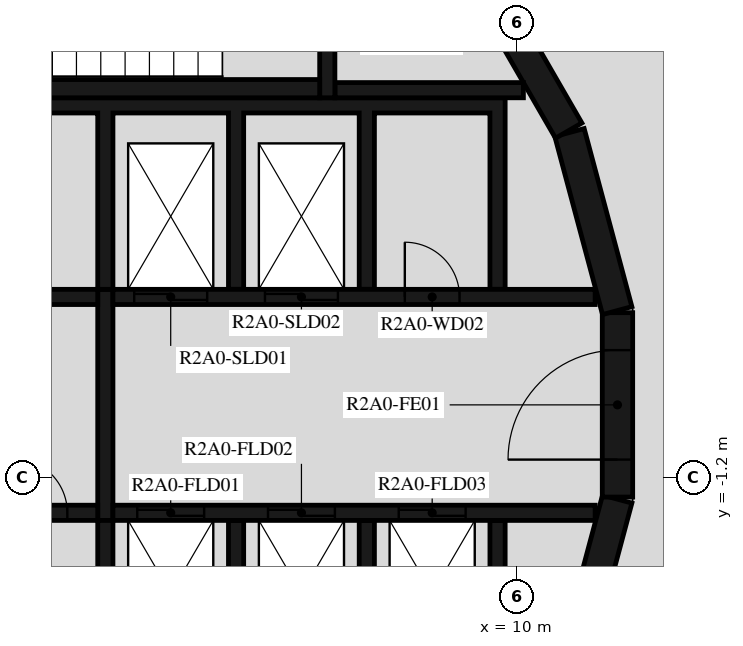
"""IFC4 building model, lengths in metres.
Left out: names, types, materials, properties, quantities, classifications, styles, units other than length and angle.
Written with IfcOpenShell. Run it as: python <this file> out.ifc"""

import sys

from ifc_helpers import new_model, si_unit, direction, frame, frame_2d, origin, place, context, subcontext, project, spatial, polyline, rectangle, outline, extrude, element, fill, save


model = new_model("IFC4")
c1 = context("Model", 3, precision=1e-05, world=origin(), true_north=direction((0.0, 1.0)))
c2 = subcontext(c1, "Body", "Model", "MODEL_VIEW")
j1 = project(units=[si_unit("LENGTHUNIT", "METRE"), si_unit("PLANEANGLEUNIT", "RADIAN")], contexts=[c1])
p1 = place(None, origin())
s1 = spatial("IfcSite", under=j1, at=p1, CompositionType="ELEMENT")
p2 = place(p1, origin())
s2 = spatial("IfcBuilding", under=s1, at=p2, CompositionType="ELEMENT")
p3 = place(p2, frame((0.0, 0.0, 76.7)))
s3 = spatial("IfcBuildingStorey", under=s2, at=p3, CompositionType="ELEMENT", Elevation=76.7)
p4 = place(p3, frame((10.858, -4.479, 0.0), z_axis=(0.0, 0.0, 1.0), x_axis=(0.258734743916, 0.965948410781, 0.0)))
e1 = element("IfcWall", 1, at=p4, inside=s3, PredefinedType="SHEAR", context=c2, shape_type="SweptSolid", body=[
    extrude(rectangle(XDim=3.033, YDim=0.5, at=frame_2d((1.516, 0.0))), origin(), (0.0, 0.0, 1.0), 3.12),
])
p5 = place(p3, frame((11.647, -1.516, 0.0), z_axis=(0.0, 0.0, 1.0), x_axis=(0.0, 1.0, 0.0)))
e2 = element("IfcWall", 2, at=p5, inside=s3, PredefinedType="SHEAR", context=c2, shape_type="SweptSolid", body=[
    extrude(rectangle(XDim=3.033, YDim=0.5, at=frame_2d((1.516, 0.0))), origin(), (0.0, 0.0, 1.0), 3.12),
])
p6 = place(p5, frame((0.616, 0.0, 0.0)))
e3 = element("IfcOpeningElement", 3, at=p6, cuts=e2, PredefinedType="OPENING", context=c2, shape_type="SweptSolid", body=[
    extrude(rectangle(XDim=1.8, YDim=2.1, at=frame_2d((0.9, 1.05))), frame((0.0, 0.26, 0.0), z_axis=(0.0, -1.0, 0.0), x_axis=(1.0, 0.0, 0.0)), (0.0, 0.0, 1.0), 0.52),
])
for number, where, z_axis, x_axis in (
    (4, (11.643, 1.55, 0.0), (0.0, 0.0, 1.0), (-0.259, 0.966, 0.0)),
    (5, (10.845, 4.51, 0.0), (0.0, 0.0, 1.0), (-0.5, 0.866, 0.0)),
):
    element("IfcWall", number, at=place(p3, frame(where, z_axis=z_axis, x_axis=x_axis)), inside=s3, PredefinedType="SHEAR", context=c2, shape_type="SweptSolid", body=[
        extrude(rectangle(XDim=3.033, YDim=0.5, at=frame_2d((1.516, 0.0))), origin(), (0.0, 0.0, 1.0), 3.12),
    ])
p7 = place(p3, frame((0.0, 5.2, 0.0), z_axis=(0.0, 0.0, 1.0), x_axis=(1.0, 0.0, 0.0)))
e6 = element("IfcWall", 6, at=p7, inside=s3, PredefinedType="SHEAR", context=c2, shape_type="SweptSolid", body=[
    extrude(rectangle(XDim=6.75, YDim=0.3, at=frame_2d((3.375, 0.0))), origin(), (0.0, 0.0, 1.0), 3.12),
])
p8 = place(p3, frame((6.875, 5.05, 0.0), z_axis=(0.0, 0.0, 1.0), x_axis=(0.0, 1.0, 0.0)))
e7 = element("IfcWall", 7, at=p8, inside=s3, PredefinedType="SHEAR", context=c2, shape_type="SweptSolid", body=[
    extrude(rectangle(XDim=3.92, YDim=0.25, at=frame_2d((1.96, 0.0))), origin(), (0.0, 0.0, 1.0), 3.12),
])
p9 = place(p8, frame((1.11, 0.0, 0.0)))
e8 = element("IfcOpeningElement", 8, at=p9, cuts=e7, PredefinedType="OPENING", context=c2, shape_type="SweptSolid", body=[
    extrude(rectangle(XDim=1.2, YDim=2.1, at=frame_2d((0.6, 1.05))), frame((0.0, 0.135, 0.0), z_axis=(0.0, -1.0, 0.0), x_axis=(1.0, 0.0, 0.0)), (0.0, 0.0, 1.0), 0.27),
])
p10 = place(p3, frame((7.0, 5.175, 0.0), z_axis=(0.0, 0.0, 1.0), x_axis=(1.0, 0.0, 0.0)))
e9 = element("IfcWall", 9, at=p10, inside=s3, PredefinedType="SHEAR", context=c2, shape_type="SweptSolid", body=[
    extrude(rectangle(XDim=3.1, YDim=0.25, at=frame_2d((1.55, 0.0))), origin(), (0.0, 0.0, 1.0), 3.12),
])
p11 = place(p3, origin())
e10 = element("IfcWall", 10, at=p11, inside=s3, PredefinedType="SHEAR", context=c2, shape_type="SweptSolid", body=[
    extrude(outline(polyline([(-9.55, 4.8), (-7.65, 4.8), (-7.65, 1.9), (-7.4, 1.9), (-7.4, 4.8), (-5.5, 4.8), (-5.5, 1.9), (-5.25, 1.9), (-5.25, 4.8), (-3.35, 4.8), (-3.35, 1.9), (-3.1, 1.9), (-3.1, 4.8), (-1.2, 4.8), (-1.2, 1.9), (-0.95, 1.9), (-0.95, 4.8), (3.1, 4.8), (3.1, 1.9), (3.35, 1.9), (3.35, 4.8), (5.25, 4.8), (5.25, 1.9), (5.5, 1.9), (5.5, 4.8), (7.4, 4.8), (7.4, 1.9), (7.65, 1.9), (7.65, 4.8), (9.55, 4.8), (9.55, 1.9), (9.8, 1.9), (9.8, 4.8), (9.8, 5.05), (-9.8, 5.05), (-9.8, 4.8), (-9.8, 1.9), (-9.55, 1.9), (-9.55, 4.8)])), origin(), (0.0, 0.0, 1.0), 3.12),
])
p12 = place(p3, origin())
e11 = element("IfcWall", 11, at=p12, inside=s3, PredefinedType="SHEAR", context=c2, shape_type="SweptSolid", body=[
    extrude(outline(polyline([(9.8, -5.05), (9.8, -4.8), (9.8, -1.9), (9.55, -1.9), (9.55, -4.8), (7.65, -4.8), (7.65, -1.9), (7.4, -1.9), (7.4, -4.8), (5.5, -4.8), (5.5, -1.9), (5.25, -1.9), (5.25, -4.8), (3.35, -4.8), (3.35, -1.9), (3.1, -1.9), (3.1, -4.8), (1.2, -4.8), (1.2, -1.9), (0.95, -1.9), (0.95, -4.8), (-0.95, -4.8), (-0.95, -1.9), (-1.2, -1.9), (-1.2, -4.8), (-5.25, -4.8), (-5.25, -1.9), (-5.5, -1.9), (-5.5, -4.8), (-7.4, -4.8), (-7.4, -1.9), (-7.65, -1.9), (-7.65, -4.8), (-9.55, -4.8), (-9.55, -1.9), (-9.8, -1.9), (-9.8, -4.8), (-9.8, -5.05), (9.8, -5.05)])), origin(), (0.0, 0.0, 1.0), 3.12),
])
p13 = place(p3, frame((-11.28, 1.775, 0.0), z_axis=(0.0, 0.0, 1.0), x_axis=(1.0, 0.0, 0.0)))
e12 = element("IfcWall", 12, at=p13, inside=s3, PredefinedType="SHEAR", context=c2, shape_type="SweptSolid", body=[
    extrude(rectangle(XDim=14.38, YDim=0.25, at=frame_2d((7.19, 0.0))), origin(), (0.0, 0.0, 1.0), 3.12),
])
p14 = place(p13, frame((2.13, 0.0, 0.0)))
e13 = element("IfcOpeningElement", 13, at=p14, cuts=e12, PredefinedType="OPENING", context=c2, shape_type="SweptSolid", body=[
    extrude(rectangle(XDim=1.1, YDim=2.1, at=frame_2d((0.55, 1.05))), frame((0.0, 0.135, 0.0), z_axis=(0.0, -1.0, 0.0), x_axis=(1.0, 0.0, 0.0)), (0.0, 0.0, 1.0), 0.27),
])
p15 = place(p13, frame((4.28, 0.0, 0.0)))
e14 = element("IfcOpeningElement", 14, at=p15, cuts=e12, PredefinedType="OPENING", context=c2, shape_type="SweptSolid", body=[
    extrude(rectangle(XDim=1.1, YDim=2.1, at=frame_2d((0.55, 1.05))), frame((0.0, 0.135, 0.0), z_axis=(0.0, -1.0, 0.0), x_axis=(1.0, 0.0, 0.0)), (0.0, 0.0, 1.0), 0.27),
])
p16 = place(p13, frame((6.43, 0.0, 0.0)))
e15 = element("IfcOpeningElement", 15, at=p16, cuts=e12, PredefinedType="OPENING", context=c2, shape_type="SweptSolid", body=[
    extrude(rectangle(XDim=1.1, YDim=2.1, at=frame_2d((0.55, 1.05))), frame((0.0, 0.135, 0.0), z_axis=(0.0, -1.0, 0.0), x_axis=(1.0, 0.0, 0.0)), (0.0, 0.0, 1.0), 0.27),
])
p17 = place(p13, frame((8.58, 0.0, 0.0)))
e16 = element("IfcOpeningElement", 16, at=p17, cuts=e12, PredefinedType="OPENING", context=c2, shape_type="SweptSolid", body=[
    extrude(rectangle(XDim=1.1, YDim=2.1, at=frame_2d((0.55, 1.05))), frame((0.0, 0.135, 0.0), z_axis=(0.0, -1.0, 0.0), x_axis=(1.0, 0.0, 0.0)), (0.0, 0.0, 1.0), 0.27),
])
p18 = place(p13, frame((11.905, 0.0, 0.0)))
e17 = element("IfcOpeningElement", 17, at=p18, cuts=e12, PredefinedType="OPENING", context=c2, shape_type="SweptSolid", body=[
    extrude(rectangle(XDim=0.9, YDim=2.1, at=frame_2d((0.45, 1.05))), frame((0.0, 0.135, 0.0), z_axis=(0.0, -1.0, 0.0), x_axis=(1.0, 0.0, 0.0)), (0.0, 0.0, 1.0), 0.27),
])
p19 = place(p3, frame((3.35, 1.775, 0.0), z_axis=(0.0, 0.0, 1.0), x_axis=(1.0, 0.0, 0.0)))
e18 = element("IfcWall", 18, at=p19, inside=s3, PredefinedType="SHEAR", context=c2, shape_type="SweptSolid", body=[
    extrude(rectangle(XDim=7.93, YDim=0.25, at=frame_2d((3.965, 0.0))), origin(), (0.0, 0.0, 1.0), 3.12),
])
p20 = place(p19, frame((0.35, 0.0, 0.0)))
e19 = element("IfcOpeningElement", 19, at=p20, cuts=e18, PredefinedType="OPENING", context=c2, shape_type="SweptSolid", body=[
    extrude(rectangle(XDim=1.2, YDim=2.4, at=frame_2d((0.6, 1.2))), frame((0.0, 0.135, 0.0), z_axis=(0.0, -1.0, 0.0), x_axis=(1.0, 0.0, 0.0)), (0.0, 0.0, 1.0), 0.27),
])
p21 = place(p19, frame((2.5, 0.0, 0.0)))
e20 = element("IfcOpeningElement", 20, at=p21, cuts=e18, PredefinedType="OPENING", context=c2, shape_type="SweptSolid", body=[
    extrude(rectangle(XDim=1.2, YDim=2.4, at=frame_2d((0.6, 1.2))), frame((0.0, 0.135, 0.0), z_axis=(0.0, -1.0, 0.0), x_axis=(1.0, 0.0, 0.0)), (0.0, 0.0, 1.0), 0.27),
])
p22 = place(p19, frame((4.8, 0.0, 0.0)))
e21 = element("IfcOpeningElement", 21, at=p22, cuts=e18, PredefinedType="OPENING", context=c2, shape_type="SweptSolid", body=[
    extrude(rectangle(XDim=0.9, YDim=2.1, at=frame_2d((0.45, 1.05))), frame((0.0, 0.135, 0.0), z_axis=(0.0, -1.0, 0.0), x_axis=(1.0, 0.0, 0.0)), (0.0, 0.0, 1.0), 0.27),
])
p23 = place(p3, frame((-11.28, -1.775, 0.0), z_axis=(0.0, 0.0, 1.0), x_axis=(1.0, 0.0, 0.0)))
e22 = element("IfcWall", 22, at=p23, inside=s3, PredefinedType="SHEAR", context=c2, shape_type="SweptSolid", body=[
    extrude(rectangle(XDim=14.38, YDim=0.25, at=frame_2d((7.19, 0.0))), origin(), (0.0, 0.0, 1.0), 3.12),
])
p24 = place(p23, frame((7.605, 0.0, 0.0)))
e23 = element("IfcOpeningElement", 23, at=p24, cuts=e22, PredefinedType="OPENING", context=c2, shape_type="SweptSolid", body=[
    extrude(rectangle(XDim=0.9, YDim=2.1, at=frame_2d((0.45, 1.05))), frame((0.0, 0.135, 0.0), z_axis=(0.0, -1.0, 0.0), x_axis=(1.0, 0.0, 0.0)), (0.0, 0.0, 1.0), 0.27),
])
p25 = place(p23, frame((10.83, 0.0, 0.0)))
e24 = element("IfcOpeningElement", 24, at=p25, cuts=e22, PredefinedType="OPENING", context=c2, shape_type="SweptSolid", body=[
    extrude(rectangle(XDim=0.9, YDim=2.1, at=frame_2d((0.45, 1.05))), frame((0.0, 0.135, 0.0), z_axis=(0.0, -1.0, 0.0), x_axis=(1.0, 0.0, 0.0)), (0.0, 0.0, 1.0), 0.27),
])
p26 = place(p23, frame((12.98, 0.0, 0.0)))
e25 = element("IfcOpeningElement", 25, at=p26, cuts=e22, PredefinedType="OPENING", context=c2, shape_type="SweptSolid", body=[
    extrude(rectangle(XDim=0.9, YDim=2.1, at=frame_2d((0.45, 1.05))), frame((0.0, 0.135, 0.0), z_axis=(0.0, -1.0, 0.0), x_axis=(1.0, 0.0, 0.0)), (0.0, 0.0, 1.0), 0.27),
])
p27 = place(p3, frame((3.35, -1.775, 0.0), z_axis=(0.0, 0.0, 1.0), x_axis=(1.0, 0.0, 0.0)))
e26 = element("IfcWall", 26, at=p27, inside=s3, PredefinedType="SHEAR", context=c2, shape_type="SweptSolid", body=[
    extrude(rectangle(XDim=7.93, YDim=0.25, at=frame_2d((3.965, 0.0))), origin(), (0.0, 0.0, 1.0), 3.12),
])
p28 = place(p27, frame((0.4, 0.0, 0.0)))
e27 = element("IfcOpeningElement", 27, at=p28, cuts=e26, PredefinedType="OPENING", context=c2, shape_type="SweptSolid", body=[
    extrude(rectangle(XDim=1.1, YDim=2.4, at=frame_2d((0.55, 1.2))), frame((0.0, 0.135, 0.0), z_axis=(0.0, -1.0, 0.0), x_axis=(1.0, 0.0, 0.0)), (0.0, 0.0, 1.0), 0.27),
])
p29 = place(p27, frame((2.55, 0.0, 0.0)))
e28 = element("IfcOpeningElement", 28, at=p29, cuts=e26, PredefinedType="OPENING", context=c2, shape_type="SweptSolid", body=[
    extrude(rectangle(XDim=1.1, YDim=2.4, at=frame_2d((0.55, 1.2))), frame((0.0, 0.135, 0.0), z_axis=(0.0, -1.0, 0.0), x_axis=(1.0, 0.0, 0.0)), (0.0, 0.0, 1.0), 0.27),
])
p30 = place(p27, frame((4.7, 0.0, 0.0)))
e29 = element("IfcOpeningElement", 29, at=p30, cuts=e26, PredefinedType="OPENING", context=c2, shape_type="SweptSolid", body=[
    extrude(rectangle(XDim=1.1, YDim=2.4, at=frame_2d((0.55, 1.2))), frame((0.0, 0.135, 0.0), z_axis=(0.0, -1.0, 0.0), x_axis=(1.0, 0.0, 0.0)), (0.0, 0.0, 1.0), 0.27),
])
p31 = place(p3, frame((3.225, -1.9, 0.0), z_axis=(0.0, 0.0, 1.0), x_axis=(0.0, 1.0, 0.0)))
e30 = element("IfcWall", 30, at=p31, inside=s3, PredefinedType="SHEAR", context=c2, shape_type="SweptSolid", body=[
    extrude(rectangle(XDim=3.8, YDim=0.25, at=frame_2d((1.9, 0.0))), origin(), (0.0, 0.0, 1.0), 3.12),
])
p32 = place(p3, frame((11.1, -8.829, 0.0), z_axis=(0.0, 0.0, 1.0), x_axis=(0.398741918631, 0.917063183388, 0.0)))
e31 = element("IfcWall", 31, at=p32, inside=s3, PredefinedType="STANDARD", context=c2, shape_type="SweptSolid", body=[
    extrude(rectangle(XDim=7.342, YDim=0.2, at=frame_2d((3.671, 0.0))), origin(), (0.0, 0.0, 1.0), 3.12),
])
p33 = place(p3, frame((13.196, 5.198, 0.0), z_axis=(0.0, 0.0, 1.0), x_axis=(-0.594805187394, 0.803869883159, 0.0)))
e32 = element("IfcWall", 32, at=p33, inside=s3, PredefinedType="STANDARD", context=c2, shape_type="SweptSolid", body=[
    extrude(rectangle(XDim=7.342, YDim=0.2, at=frame_2d((3.671, 0.0))), origin(), (0.0, 0.0, 1.0), 3.12),
])
p34 = place(p33, frame((4.7, 0.0, 0.0)))
e33 = element("IfcOpeningElement", 33, at=p34, cuts=e32, PredefinedType="OPENING", context=c2, shape_type="SweptSolid", body=[
    extrude(rectangle(XDim=1.0, YDim=2.1, at=frame_2d((0.5, 1.05))), frame((0.0, 0.11, 0.0), z_axis=(0.0, -1.0, 0.0), x_axis=(1.0, 0.0, 0.0)), (0.0, 0.0, 1.0), 0.22),
])
p35 = place(p3, frame((14.641, 5.767, 0.0), z_axis=(0.0, 0.0, 1.0), x_axis=(-0.594785744505, 0.803884269117, 0.0)))
e34 = element("IfcWall", 34, at=p35, inside=s3, PredefinedType="PARTITIONING", context=c2, shape_type="SweptSolid", body=[
    extrude(rectangle(XDim=4.573, YDim=0.12, at=frame_2d((2.287, 0.0))), origin(), (0.0, 0.0, 1.0), 3.12),
])
p36 = place(p35, frame((0.513, 0.0, 0.0)))
e35 = element("IfcOpeningElement", 35, at=p36, cuts=e34, PredefinedType="OPENING", context=c2, shape_type="SweptSolid", body=[
    extrude(rectangle(XDim=0.9, YDim=2.1, at=frame_2d((0.45, 1.05))), frame((0.0, 0.07, 0.0), z_axis=(0.0, -1.0, 0.0), x_axis=(1.0, 0.0, 0.0)), (0.0, 0.0, 1.0), 0.14),
])
p37 = place(p6, origin())
e36 = element("IfcDoor", 36, at=p37, inside=s3, OperationType="DOUBLE_DOOR_SINGLE_SWING", PredefinedType="DOOR", context=c2, shape_type="SweptSolid", body=[
    extrude(rectangle(XDim=1.8, YDim=2.1, at=frame_2d((0.9, 1.05))), frame((0.0, 0.025, 0.0), z_axis=(0.0, -1.0, 0.0), x_axis=(1.0, 0.0, 0.0)), (0.0, 0.0, 1.0), 0.05),
])
fill(e3, e36)
p38 = place(p20, origin())
e37 = element("IfcDoor", 37, at=p38, inside=s3, OperationType="DOUBLE_DOOR_SLIDING", PredefinedType="DOOR", context=c2, shape_type="SweptSolid", body=[
    extrude(rectangle(XDim=1.2, YDim=2.4, at=frame_2d((0.6, 1.2))), frame((0.0, 0.025, 0.0), z_axis=(0.0, -1.0, 0.0), x_axis=(1.0, 0.0, 0.0)), (0.0, 0.0, 1.0), 0.05),
])
fill(e19, e37)
p39 = place(p21, origin())
e38 = element("IfcDoor", 38, at=p39, inside=s3, OperationType="DOUBLE_DOOR_SLIDING", PredefinedType="DOOR", context=c2, shape_type="SweptSolid", body=[
    extrude(rectangle(XDim=1.2, YDim=2.4, at=frame_2d((0.6, 1.2))), frame((0.0, 0.025, 0.0), z_axis=(0.0, -1.0, 0.0), x_axis=(1.0, 0.0, 0.0)), (0.0, 0.0, 1.0), 0.05),
])
fill(e20, e38)
p40 = place(p28, origin())
e39 = element("IfcDoor", 39, at=p40, inside=s3, OperationType="DOUBLE_DOOR_SLIDING", PredefinedType="DOOR", context=c2, shape_type="SweptSolid", body=[
    extrude(rectangle(XDim=1.1, YDim=2.4, at=frame_2d((0.55, 1.2))), frame((0.0, 0.025, 0.0), z_axis=(0.0, -1.0, 0.0), x_axis=(1.0, 0.0, 0.0)), (0.0, 0.0, 1.0), 0.05),
])
fill(e27, e39)
p41 = place(p29, origin())
e40 = element("IfcDoor", 40, at=p41, inside=s3, OperationType="DOUBLE_DOOR_SLIDING", PredefinedType="DOOR", context=c2, shape_type="SweptSolid", body=[
    extrude(rectangle(XDim=1.1, YDim=2.4, at=frame_2d((0.55, 1.2))), frame((0.0, 0.025, 0.0), z_axis=(0.0, -1.0, 0.0), x_axis=(1.0, 0.0, 0.0)), (0.0, 0.0, 1.0), 0.05),
])
fill(e28, e40)
p42 = place(p30, origin())
e41 = element("IfcDoor", 41, at=p42, inside=s3, OperationType="DOUBLE_DOOR_SLIDING", PredefinedType="DOOR", context=c2, shape_type="SweptSolid", body=[
    extrude(rectangle(XDim=1.1, YDim=2.4, at=frame_2d((0.55, 1.2))), frame((0.0, 0.025, 0.0), z_axis=(0.0, -1.0, 0.0), x_axis=(1.0, 0.0, 0.0)), (0.0, 0.0, 1.0), 0.05),
])
fill(e29, e41)
p43 = place(p22, origin())
e42 = element("IfcDoor", 42, at=p43, inside=s3, OperationType="SINGLE_SWING_LEFT", PredefinedType="DOOR", context=c2, shape_type="SweptSolid", body=[
    extrude(rectangle(XDim=0.9, YDim=2.1, at=frame_2d((0.45, 1.05))), frame((0.0, 0.025, 0.0), z_axis=(0.0, -1.0, 0.0), x_axis=(1.0, 0.0, 0.0)), (0.0, 0.0, 1.0), 0.05),
])
fill(e21, e42)
p44 = place(p26, origin())
e43 = element("IfcDoor", 43, at=p44, inside=s3, OperationType="SINGLE_SWING_RIGHT", PredefinedType="DOOR", context=c2, shape_type="SweptSolid", body=[
    extrude(rectangle(XDim=0.9, YDim=2.1, at=frame_2d((0.45, 1.05))), frame((0.0, 0.025, 0.0), z_axis=(0.0, -1.0, 0.0), x_axis=(1.0, 0.0, 0.0)), (0.0, 0.0, 1.0), 0.05),
])
fill(e25, e43)
save(model, sys.argv[1])
